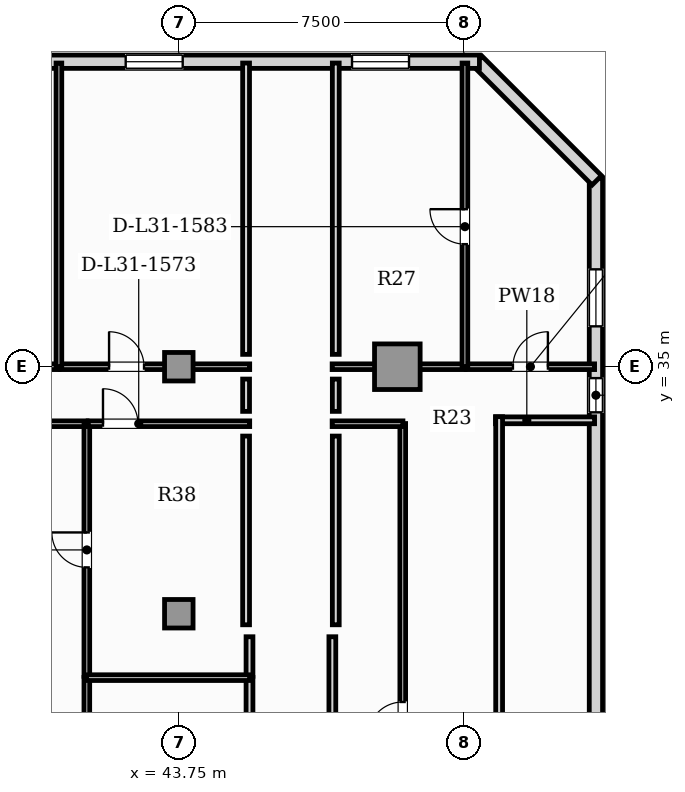
"""IFC4 building model, lengths in metres.
Left out: names, types, materials, properties, quantities, classifications, styles, units other than length and angle.
Written with IfcOpenShell. Run it as: python <this file> out.ifc"""

import sys

from ifc_helpers import new_model, si_unit, direction, frame, frame_2d, origin, origin_2d, place, context, subcontext, project, spatial, rectangle, hollow_rectangle, extrude, element, fill, save


model = new_model("IFC4")
c1 = context("Model", 3, precision=1e-05, world=origin(), true_north=direction((0.0, 1.0)))
c2 = subcontext(c1, "Body", "Model", "MODEL_VIEW")
j1 = project(units=[si_unit("LENGTHUNIT", "METRE"), si_unit("PLANEANGLEUNIT", "RADIAN")], contexts=[c1])
p1 = place(None, origin())
s1 = spatial("IfcSite", under=j1, at=p1, CompositionType="ELEMENT")
p2 = place(p1, origin())
s2 = spatial("IfcBuilding", under=s1, at=p2, CompositionType="ELEMENT")
p3 = place(p2, frame((0.0, 0.0, 127.25)))
s3 = spatial("IfcBuildingStorey", under=s2, at=p3, CompositionType="ELEMENT", Elevation=127.25)
p4 = place(p3, frame((49.5, 35.0, 0.0), z_axis=(0.0, 0.0, 1.0), x_axis=(1.0, 0.0, 0.0)))
e1 = element("IfcColumn", 1, at=p4, inside=s3, PredefinedType="USERDEFINED", context=c2, shape_type="SweptSolid", body=[
    extrude(hollow_rectangle(XDim=1.2, YDim=1.2, WallThickness=0.07, at=origin_2d()), origin(), (0.0, 0.0, 1.0), 3.85),
])
for number, where, z_axis, x_axis in (
    (2, (43.75, 28.5, 0.0), (0.0, 0.0, 1.0), (1.0, 0.0, 0.0)),
    (3, (43.75, 35.0, 0.0), (0.0, 0.0, 1.0), (1.0, 0.0, 0.0)),
):
    element("IfcColumn", number, at=place(p3, frame(where, z_axis=z_axis, x_axis=x_axis)), inside=s3, PredefinedType="COLUMN", context=c2, shape_type="SweptSolid", body=[
        extrude(rectangle(XDim=0.75, YDim=0.75, at=origin_2d()), origin(), (0.0, 0.0, 1.0), 3.85),
    ])
p5 = place(p3, frame((54.725, 3.24, 0.0), z_axis=(0.0, 0.0, 1.0), x_axis=(0.0, 1.0, 0.0)))
e4 = element("IfcWall", 4, at=p5, inside=s3, PredefinedType="SOLIDWALL", context=c2, shape_type="SweptSolid", body=[
    extrude(rectangle(XDim=36.72, YDim=0.35, at=frame_2d((18.36, 0.0))), origin(), (0.0, 0.0, 1.0), 3.6),
])
p6 = place(p5, frame((30.56, 0.0, 0.95)))
e5 = element("IfcOpeningElement", 5, at=p6, cuts=e4, PredefinedType="OPENING", context=c2, shape_type="SweptSolid", body=[
    extrude(rectangle(XDim=0.9, YDim=1.5, at=frame_2d((0.45, 0.75))), frame((0.0, 0.185, 0.0), z_axis=(0.0, -1.0, 0.0), x_axis=(1.0, 0.0, 0.0)), (0.0, 0.0, 1.0), 0.37),
])
p7 = place(p5, frame((12.83, 0.0, 0.9)))
e6 = element("IfcOpeningElement", 6, at=p7, cuts=e4, PredefinedType="OPENING", context=c2, shape_type="SweptSolid", body=[
    extrude(rectangle(XDim=1.5, YDim=1.95, at=frame_2d((0.75, 0.975))), frame((0.0, 0.185, 0.0), z_axis=(0.0, -1.0, 0.0), x_axis=(1.0, 0.0, 0.0)), (0.0, 0.0, 1.0), 0.37),
])
p8 = place(p5, frame((32.823, 0.0, 0.9)))
e7 = element("IfcOpeningElement", 7, at=p8, cuts=e4, PredefinedType="OPENING", context=c2, shape_type="SweptSolid", body=[
    extrude(rectangle(XDim=1.5, YDim=1.95, at=frame_2d((0.75, 0.975))), frame((0.0, 0.185, 0.0), z_axis=(0.0, -1.0, 0.0), x_axis=(1.0, 0.0, 0.0)), (0.0, 0.0, 1.0), 0.37),
])
p9 = place(p3, frame((54.748, 39.905, 0.0), z_axis=(0.0, 0.0, 1.0), x_axis=(-0.707106781187, 0.707106781187, 0.0)))
e8 = element("IfcWall", 8, at=p9, inside=s3, PredefinedType="SOLIDWALL", context=c2, shape_type="SweptSolid", body=[
    extrude(rectangle(XDim=4.446, YDim=0.35, at=frame_2d((2.223, 0.0))), origin(), (0.0, 0.0, 1.0), 3.6),
])
p10 = place(p3, frame((51.66, 43.025, 0.0), z_axis=(0.0, 0.0, 1.0), x_axis=(-1.0, 0.0, 0.0)))
e9 = element("IfcWall", 9, at=p10, inside=s3, PredefinedType="SOLIDWALL", context=c2, shape_type="SweptSolid", body=[
    extrude(rectangle(XDim=45.82, YDim=0.35, at=frame_2d((22.91, 0.0))), origin(), (0.0, 0.0, 1.0), 3.6),
])
p11 = place(p10, frame((42.468, 0.0, 0.9)))
e10 = element("IfcOpeningElement", 10, at=p11, cuts=e9, PredefinedType="OPENING", context=c2, shape_type="SweptSolid", body=[
    extrude(rectangle(XDim=1.5, YDim=1.95, at=frame_2d((0.75, 0.975))), frame((0.0, 0.185, 0.0), z_axis=(0.0, -1.0, 0.0), x_axis=(1.0, 0.0, 0.0)), (0.0, 0.0, 1.0), 0.37),
])
p12 = place(p10, frame((1.853, 0.0, 0.9)))
e11 = element("IfcOpeningElement", 11, at=p12, cuts=e9, PredefinedType="OPENING", context=c2, shape_type="SweptSolid", body=[
    extrude(rectangle(XDim=1.5, YDim=1.95, at=frame_2d((0.75, 0.975))), frame((0.0, 0.185, 0.0), z_axis=(0.0, -1.0, 0.0), x_axis=(1.0, 0.0, 0.0)), (0.0, 0.0, 1.0), 0.37),
])
p13 = place(p10, frame((36.457, 0.0, 0.9)))
e12 = element("IfcOpeningElement", 12, at=p13, cuts=e9, PredefinedType="OPENING", context=c2, shape_type="SweptSolid", body=[
    extrude(rectangle(XDim=1.5, YDim=1.95, at=frame_2d((0.75, 0.975))), frame((0.0, 0.185, 0.0), z_axis=(0.0, -1.0, 0.0), x_axis=(1.0, 0.0, 0.0)), (0.0, 0.0, 1.0), 0.37),
])
p14 = place(p10, frame((31.777, 0.0, 0.9)))
e13 = element("IfcOpeningElement", 13, at=p14, cuts=e9, PredefinedType="OPENING", context=c2, shape_type="SweptSolid", body=[
    extrude(rectangle(XDim=1.5, YDim=1.95, at=frame_2d((0.75, 0.975))), frame((0.0, 0.185, 0.0), z_axis=(0.0, -1.0, 0.0), x_axis=(1.0, 0.0, 0.0)), (0.0, 0.0, 1.0), 0.37),
])
p15 = place(p10, frame((27.748, 0.0, 0.9)))
e14 = element("IfcOpeningElement", 14, at=p15, cuts=e9, PredefinedType="OPENING", context=c2, shape_type="SweptSolid", body=[
    extrude(rectangle(XDim=1.5, YDim=1.95, at=frame_2d((0.75, 0.975))), frame((0.0, 0.185, 0.0), z_axis=(0.0, -1.0, 0.0), x_axis=(1.0, 0.0, 0.0)), (0.0, 0.0, 1.0), 0.37),
])
p16 = place(p10, frame((23.998, 0.0, 0.9)))
e15 = element("IfcOpeningElement", 15, at=p16, cuts=e9, PredefinedType="OPENING", context=c2, shape_type="SweptSolid", body=[
    extrude(rectangle(XDim=1.5, YDim=1.95, at=frame_2d((0.75, 0.975))), frame((0.0, 0.185, 0.0), z_axis=(0.0, -1.0, 0.0), x_axis=(1.0, 0.0, 0.0)), (0.0, 0.0, 1.0), 0.37),
])
p17 = place(p10, frame((20.118, 0.0, 0.9)))
e16 = element("IfcOpeningElement", 16, at=p17, cuts=e9, PredefinedType="OPENING", context=c2, shape_type="SweptSolid", body=[
    extrude(rectangle(XDim=1.5, YDim=1.95, at=frame_2d((0.75, 0.975))), frame((0.0, 0.185, 0.0), z_axis=(0.0, -1.0, 0.0), x_axis=(1.0, 0.0, 0.0)), (0.0, 0.0, 1.0), 0.37),
])
p18 = place(p10, frame((16.368, 0.0, 0.9)))
e17 = element("IfcOpeningElement", 17, at=p18, cuts=e9, PredefinedType="OPENING", context=c2, shape_type="SweptSolid", body=[
    extrude(rectangle(XDim=1.5, YDim=1.95, at=frame_2d((0.75, 0.975))), frame((0.0, 0.185, 0.0), z_axis=(0.0, -1.0, 0.0), x_axis=(1.0, 0.0, 0.0)), (0.0, 0.0, 1.0), 0.37),
])
p19 = place(p10, frame((12.487, 0.0, 0.9)))
e18 = element("IfcOpeningElement", 18, at=p19, cuts=e9, PredefinedType="OPENING", context=c2, shape_type="SweptSolid", body=[
    extrude(rectangle(XDim=1.5, YDim=1.95, at=frame_2d((0.75, 0.975))), frame((0.0, 0.185, 0.0), z_axis=(0.0, -1.0, 0.0), x_axis=(1.0, 0.0, 0.0)), (0.0, 0.0, 1.0), 0.37),
])
p20 = place(p10, frame((7.807, 0.0, 0.9)))
e19 = element("IfcOpeningElement", 19, at=p20, cuts=e9, PredefinedType="OPENING", context=c2, shape_type="SweptSolid", body=[
    extrude(rectangle(XDim=1.5, YDim=1.95, at=frame_2d((0.75, 0.975))), frame((0.0, 0.185, 0.0), z_axis=(0.0, -1.0, 0.0), x_axis=(1.0, 0.0, 0.0)), (0.0, 0.0, 1.0), 0.37),
])
p21 = place(p3, frame((47.79, 17.931, 0.0), z_axis=(0.0, 0.0, 1.0), x_axis=(0.0, 1.0, 0.0)))
e20 = element("IfcWall", 20, at=p21, inside=s3, PredefinedType="PARTITIONING", context=c2, shape_type="SweptSolid", body=[
    extrude(rectangle(XDim=9.964, YDim=0.18, at=frame_2d((4.982, 0.0))), origin(), (0.0, 0.0, 1.0), 3.6),
])
p22 = place(p3, frame((45.61, 21.59, 0.0), z_axis=(0.0, 0.0, 1.0), x_axis=(0.0, 1.0, 0.0)))
e21 = element("IfcWall", 21, at=p22, inside=s3, PredefinedType="PARTITIONING", context=c2, shape_type="SweptSolid", body=[
    extrude(rectangle(XDim=5.234, YDim=0.18, at=frame_2d((2.617, 0.0))), origin(), (0.0, 0.0, 1.0), 3.6),
])
p23 = place(p3, frame((45.61, 26.854, 0.0), z_axis=(0.0, 0.0, 1.0), x_axis=(0.0, 1.0, 0.0)))
e22 = element("IfcWall", 22, at=p23, inside=s3, PredefinedType="PARTITIONING", context=c2, shape_type="SweptSolid", body=[
    extrude(rectangle(XDim=1.041, YDim=0.18, at=frame_2d((0.521, 0.0))), origin(), (0.0, 0.0, 1.0), 3.6),
])
p24 = place(p3, frame((49.642, 17.931, 0.0), z_axis=(0.0, 0.0, 1.0), x_axis=(0.0, 1.0, 0.0)))
e23 = element("IfcWall", 23, at=p24, inside=s3, PredefinedType="PARTITIONING", context=c2, shape_type="SweptSolid", body=[
    extrude(rectangle(XDim=15.573, YDim=0.15, at=frame_2d((7.787, 0.0))), origin(), (0.0, 0.0, 1.0), 3.055),
])
p25 = place(p24, frame((7.327, 0.0, 0.0)))
e24 = element("IfcOpeningElement", 24, at=p25, cuts=e23, PredefinedType="OPENING", context=c2, shape_type="SweptSolid", body=[
    extrude(rectangle(XDim=0.92, YDim=2.1, at=frame_2d((0.46, 1.05))), frame((0.0, 0.085, 0.0), z_axis=(0.0, -1.0, 0.0), x_axis=(1.0, 0.0, 0.0)), (0.0, 0.0, 1.0), 0.17),
])
p26 = place(p3, frame((47.785, 33.5, 0.0), z_axis=(0.0, 0.0, 1.0), x_axis=(1.0, 0.0, 0.0)))
e25 = element("IfcWall", 25, at=p26, inside=s3, PredefinedType="PARTITIONING", context=c2, shape_type="SweptSolid", body=[
    extrude(rectangle(XDim=1.863, YDim=0.15, at=frame_2d((0.931, 0.0))), origin(), (0.0, 0.0, 1.0), 3.6),
])
p27 = place(p3, frame((47.785, 35.0, 0.0), z_axis=(0.0, 0.0, 1.0), x_axis=(1.0, 0.0, 0.0)))
e26 = element("IfcWall", 26, at=p27, inside=s3, PredefinedType="PARTITIONING", context=c2, shape_type="SweptSolid", body=[
    extrude(rectangle(XDim=3.498, YDim=0.15, at=frame_2d((1.749, 0.0))), origin(), (0.0, 0.0, 1.0), 2.983),
])
p28 = place(p3, frame((51.313, 35.0, 0.0), z_axis=(0.0, 0.0, 1.0), x_axis=(1.0, 0.0, 0.0)))
e27 = element("IfcWall", 27, at=p28, inside=s3, PredefinedType="PARTITIONING", context=c2, shape_type="SweptSolid", body=[
    extrude(rectangle(XDim=3.377, YDim=0.15, at=frame_2d((1.688, 0.0))), origin(), (0.0, 0.0, 1.0), 3.6),
])
p29 = place(p28, frame((1.229, 0.0, 0.0)))
e28 = element("IfcOpeningElement", 28, at=p29, cuts=e27, PredefinedType="OPENING", context=c2, shape_type="SweptSolid", body=[
    extrude(rectangle(XDim=0.92, YDim=2.1, at=frame_2d((0.46, 1.05))), frame((0.0, 0.085, 0.0), z_axis=(0.0, -1.0, 0.0), x_axis=(1.0, 0.0, 0.0)), (0.0, 0.0, 1.0), 0.17),
])
p30 = place(p3, frame((51.278, 34.995, 0.0), z_axis=(0.0, 0.0, 1.0), x_axis=(0.0, 1.0, 0.0)))
e29 = element("IfcWall", 29, at=p30, inside=s3, PredefinedType="PARTITIONING", context=c2, shape_type="SweptSolid", body=[
    extrude(rectangle(XDim=7.995, YDim=0.15, at=frame_2d((3.998, 0.0))), origin(), (0.0, 0.0, 1.0), 3.6),
])
p31 = place(p30, frame((3.23, 0.0, 0.0)))
e30 = element("IfcOpeningElement", 30, at=p31, cuts=e29, PredefinedType="OPENING", context=c2, shape_type="SweptSolid", body=[
    extrude(rectangle(XDim=0.92, YDim=2.1, at=frame_2d((0.46, 1.05))), frame((0.0, 0.085, 0.0), z_axis=(0.0, -1.0, 0.0), x_axis=(1.0, 0.0, 0.0)), (0.0, 0.0, 1.0), 0.17),
])
p32 = place(p3, frame((31.435, 33.5, 0.0), z_axis=(0.0, 0.0, 1.0), x_axis=(1.0, 0.0, 0.0)))
e31 = element("IfcWall", 31, at=p32, inside=s3, PredefinedType="PARTITIONING", context=c2, shape_type="SweptSolid", body=[
    extrude(rectangle(XDim=9.9, YDim=0.15, at=frame_2d((4.95, 0.0))), origin(), (0.0, 0.0, 1.0), 3.6),
])
p33 = place(p32, frame((3.005, 0.0, 0.0)))
e32 = element("IfcOpeningElement", 32, at=p33, cuts=e31, PredefinedType="OPENING", context=c2, shape_type="SweptSolid", body=[
    extrude(rectangle(XDim=0.92, YDim=2.1, at=frame_2d((0.46, 1.05))), frame((0.0, 0.085, 0.0), z_axis=(0.0, -1.0, 0.0), x_axis=(1.0, 0.0, 0.0)), (0.0, 0.0, 1.0), 0.17),
])
p34 = place(p3, frame((41.33, 21.59, 0.0), z_axis=(0.0, 0.0, 1.0), x_axis=(0.0, 1.0, 0.0)))
e33 = element("IfcWall", 33, at=p34, inside=s3, PredefinedType="PARTITIONING", context=c2, shape_type="SweptSolid", body=[
    extrude(rectangle(XDim=5.234, YDim=0.15, at=frame_2d((2.617, 0.0))), origin(), (0.0, 0.0, 1.0), 3.6),
])
p35 = place(p34, frame((2.157, 0.0, 0.0)))
e34 = element("IfcOpeningElement", 34, at=p35, cuts=e33, PredefinedType="OPENING", context=c2, shape_type="SweptSolid", body=[
    extrude(rectangle(XDim=0.92, YDim=2.1, at=frame_2d((0.46, 1.05))), frame((0.0, 0.085, 0.0), z_axis=(0.0, -1.0, 0.0), x_axis=(1.0, 0.0, 0.0)), (0.0, 0.0, 1.0), 0.17),
])
p36 = place(p3, frame((41.33, 26.854, 0.0), z_axis=(0.0, 0.0, 1.0), x_axis=(0.0, 1.0, 0.0)))
e35 = element("IfcWall", 35, at=p36, inside=s3, PredefinedType="PARTITIONING", context=c2, shape_type="SweptSolid", body=[
    extrude(rectangle(XDim=6.651, YDim=0.15, at=frame_2d((3.325, 0.0))), origin(), (0.0, 0.0, 1.0), 3.6),
])
p37 = place(p36, frame((2.865, 0.0, 0.0)))
e36 = element("IfcOpeningElement", 36, at=p37, cuts=e35, PredefinedType="OPENING", context=c2, shape_type="SweptSolid", body=[
    extrude(rectangle(XDim=0.92, YDim=2.1, at=frame_2d((0.46, 1.05))), frame((0.0, 0.085, 0.0), z_axis=(0.0, -1.0, 0.0), x_axis=(1.0, 0.0, 0.0)), (0.0, 0.0, 1.0), 0.17),
])
p38 = place(p3, frame((41.365, 33.5, 0.0), z_axis=(0.0, 0.0, 1.0), x_axis=(1.0, 0.0, 0.0)))
e37 = element("IfcWall", 37, at=p38, inside=s3, PredefinedType="PARTITIONING", context=c2, shape_type="SweptSolid", body=[
    extrude(rectangle(XDim=4.25, YDim=0.15, at=frame_2d((2.125, 0.0))), origin(), (0.0, 0.0, 1.0), 3.6),
])
p39 = place(p38, frame((0.39, 0.0, 0.0)))
e38 = element("IfcOpeningElement", 38, at=p39, cuts=e37, PredefinedType="OPENING", context=c2, shape_type="SweptSolid", body=[
    extrude(rectangle(XDim=0.92, YDim=2.1, at=frame_2d((0.46, 1.05))), frame((0.0, 0.085, 0.0), z_axis=(0.0, -1.0, 0.0), x_axis=(1.0, 0.0, 0.0)), (0.0, 0.0, 1.0), 0.17),
])
p40 = place(p3, frame((36.285, 35.0, 0.0), z_axis=(0.0, 0.0, 1.0), x_axis=(1.0, 0.0, 0.0)))
e39 = element("IfcWall", 39, at=p40, inside=s3, PredefinedType="PARTITIONING", context=c2, shape_type="SweptSolid", body=[
    extrude(rectangle(XDim=4.315, YDim=0.15, at=frame_2d((2.158, 0.0))), origin(), (0.0, 0.0, 1.0), 2.983),
])
p41 = place(p40, frame((1.698, 0.0, 0.0)))
e40 = element("IfcOpeningElement", 40, at=p41, cuts=e39, PredefinedType="OPENING", context=c2, shape_type="SweptSolid", body=[
    extrude(rectangle(XDim=0.92, YDim=2.1, at=frame_2d((0.46, 1.05))), frame((0.0, 0.085, 0.0), z_axis=(0.0, -1.0, 0.0), x_axis=(1.0, 0.0, 0.0)), (0.0, 0.0, 1.0), 0.17),
])
p42 = place(p3, frame((40.63, 35.0, 0.0), z_axis=(0.0, 0.0, 1.0), x_axis=(1.0, 0.0, 0.0)))
e41 = element("IfcWall", 41, at=p42, inside=s3, PredefinedType="PARTITIONING", context=c2, shape_type="SweptSolid", body=[
    extrude(rectangle(XDim=4.985, YDim=0.15, at=frame_2d((2.492, 0.0))), origin(), (0.0, 0.0, 1.0), 2.983),
])
p43 = place(p42, frame((1.285, 0.0, 0.0)))
e42 = element("IfcOpeningElement", 42, at=p43, cuts=e41, PredefinedType="OPENING", context=c2, shape_type="SweptSolid", body=[
    extrude(rectangle(XDim=0.92, YDim=2.1, at=frame_2d((0.46, 1.05))), frame((0.0, 0.085, 0.0), z_axis=(0.0, -1.0, 0.0), x_axis=(1.0, 0.0, 0.0)), (0.0, 0.0, 1.0), 0.17),
])
p44 = place(p3, frame((41.325, 26.819, 0.0), z_axis=(0.0, 0.0, 1.0), x_axis=(1.0, 0.0, 0.0)))
e43 = element("IfcWall", 43, at=p44, inside=s3, PredefinedType="PARTITIONING", context=c2, shape_type="SweptSolid", body=[
    extrude(rectangle(XDim=4.29, YDim=0.15, at=frame_2d((2.145, 0.0))), origin(), (0.0, 0.0, 1.0), 3.6),
])
p45 = place(p3, frame((40.595, 34.995, 0.0), z_axis=(0.0, 0.0, 1.0), x_axis=(0.0, 1.0, 0.0)))
e44 = element("IfcWall", 44, at=p45, inside=s3, PredefinedType="PARTITIONING", context=c2, shape_type="SweptSolid", body=[
    extrude(rectangle(XDim=7.995, YDim=0.15, at=frame_2d((3.998, 0.0))), origin(), (0.0, 0.0, 1.0), 3.6),
])
p46 = place(p3, frame((47.88, 33.825, 0.0), z_axis=(0.0, 0.0, 1.0), x_axis=(0.0, 1.0, 0.0)))
e45 = element("IfcWall", 45, at=p46, inside=s3, PredefinedType="PARTITIONING", context=c2, shape_type="SweptSolid", body=[
    extrude(rectangle(XDim=0.85, YDim=0.18, at=frame_2d((0.425, 0.0))), origin(), (0.0, 0.0, 1.0), 3.6),
])
p47 = place(p3, frame((54.69, 33.59, 0.0), z_axis=(0.0, 0.0, 1.0), x_axis=(-1.0, 0.0, 0.0)))
e46 = element("IfcWall", 46, at=p47, inside=s3, PredefinedType="PARTITIONING", context=c2, shape_type="SweptSolid", body=[
    extrude(rectangle(XDim=2.606, YDim=0.18, at=frame_2d((1.303, 0.0))), origin(), (0.0, 0.0, 1.0), 3.6),
])
p48 = place(p3, frame((52.178, 33.685, 0.0), z_axis=(0.0, 0.0, 1.0), x_axis=(0.0, -1.0, 0.0)))
e47 = element("IfcWall", 47, at=p48, inside=s3, PredefinedType="PARTITIONING", context=c2, shape_type="SweptSolid", body=[
    extrude(rectangle(XDim=13.495, YDim=0.18, at=frame_2d((6.748, 0.0))), origin(), (0.0, 0.0, 1.0), 3.6),
])
p49 = place(p3, frame((47.88, 28.21, 0.0), z_axis=(0.0, 0.0, 1.0), x_axis=(0.0, 1.0, 0.0)))
e48 = element("IfcWall", 48, at=p49, inside=s3, PredefinedType="PARTITIONING", context=c2, shape_type="SweptSolid", body=[
    extrude(rectangle(XDim=4.965, YDim=0.18, at=frame_2d((2.482, 0.0))), origin(), (0.0, 0.0, 1.0), 3.6),
])
p50 = place(p3, frame((47.88, 35.325, 0.0), z_axis=(0.0, 0.0, 1.0), x_axis=(0.0, 1.0, 0.0)))
e49 = element("IfcWall", 49, at=p50, inside=s3, PredefinedType="PARTITIONING", context=c2, shape_type="SweptSolid", body=[
    extrude(rectangle(XDim=7.665, YDim=0.18, at=frame_2d((3.833, 0.0))), origin(), (0.0, 0.0, 1.0), 3.6),
])
p51 = place(p3, frame((45.52, 34.675, 0.0), z_axis=(0.0, 0.0, 1.0), x_axis=(0.0, -1.0, 0.0)))
e50 = element("IfcWall", 50, at=p51, inside=s3, PredefinedType="PARTITIONING", context=c2, shape_type="SweptSolid", body=[
    extrude(rectangle(XDim=0.85, YDim=0.18, at=frame_2d((0.425, 0.0))), origin(), (0.0, 0.0, 1.0), 3.6),
])
p52 = place(p3, frame((45.52, 33.175, 0.0), z_axis=(0.0, 0.0, 1.0), x_axis=(0.0, -1.0, 0.0)))
e51 = element("IfcWall", 51, at=p52, inside=s3, PredefinedType="PARTITIONING", context=c2, shape_type="SweptSolid", body=[
    extrude(rectangle(XDim=4.965, YDim=0.18, at=frame_2d((2.482, 0.0))), origin(), (0.0, 0.0, 1.0), 3.6),
])
p53 = place(p3, frame((45.52, 42.99, 0.0), z_axis=(0.0, 0.0, 1.0), x_axis=(0.0, -1.0, 0.0)))
e52 = element("IfcWall", 52, at=p53, inside=s3, PredefinedType="PARTITIONING", context=c2, shape_type="SweptSolid", body=[
    extrude(rectangle(XDim=7.665, YDim=0.18, at=frame_2d((3.833, 0.0))), origin(), (0.0, 0.0, 1.0), 3.6),
])
p54 = place(p6, origin())
e53 = element("IfcWindow", 53, at=p54, inside=s3, PartitioningType="SINGLE_PANEL", PredefinedType="WINDOW", context=c2, shape_type="SweptSolid", body=[
    extrude(rectangle(XDim=0.9, YDim=1.5, at=frame_2d((0.45, 0.75))), frame((0.0, 0.03, 0.0), z_axis=(0.0, -1.0, 0.0), x_axis=(1.0, 0.0, 0.0)), (0.0, 0.0, 1.0), 0.06),
])
fill(e5, e53)
p55 = place(p12, origin())
e54 = element("IfcWindow", 54, at=p55, inside=s3, PartitioningType="SINGLE_PANEL", PredefinedType="WINDOW", context=c2, shape_type="SweptSolid", body=[
    extrude(rectangle(XDim=1.5, YDim=1.95, at=frame_2d((0.75, 0.975))), frame((0.0, 0.03, 0.0), z_axis=(0.0, -1.0, 0.0), x_axis=(1.0, 0.0, 0.0)), (0.0, 0.0, 1.0), 0.06),
])
fill(e11, e54)
p56 = place(p8, origin())
e55 = element("IfcWindow", 55, at=p56, inside=s3, PartitioningType="SINGLE_PANEL", PredefinedType="WINDOW", context=c2, shape_type="SweptSolid", body=[
    extrude(rectangle(XDim=1.5, YDim=1.95, at=frame_2d((0.75, 0.975))), frame((0.0, 0.03, 0.0), z_axis=(0.0, -1.0, 0.0), x_axis=(1.0, 0.0, 0.0)), (0.0, 0.0, 1.0), 0.06),
])
fill(e7, e55)
p57 = place(p20, origin())
e56 = element("IfcWindow", 56, at=p57, inside=s3, PartitioningType="SINGLE_PANEL", PredefinedType="WINDOW", context=c2, shape_type="SweptSolid", body=[
    extrude(rectangle(XDim=1.5, YDim=1.95, at=frame_2d((0.75, 0.975))), frame((0.0, 0.03, 0.0), z_axis=(0.0, -1.0, 0.0), x_axis=(1.0, 0.0, 0.0)), (0.0, 0.0, 1.0), 0.06),
])
fill(e19, e56)
p58 = place(p25, origin())
e57 = element("IfcDoor", 57, at=p58, inside=s3, OperationType="SINGLE_SWING_LEFT", PredefinedType="DOOR", context=c2, shape_type="SweptSolid", body=[
    extrude(rectangle(XDim=0.92, YDim=2.1, at=frame_2d((0.46, 1.05))), frame((0.0, 0.025, 0.0), z_axis=(0.0, -1.0, 0.0), x_axis=(1.0, 0.0, 0.0)), (0.0, 0.0, 1.0), 0.05),
])
fill(e24, e57)
p59 = place(p29, origin())
e58 = element("IfcDoor", 58, at=p59, inside=s3, OperationType="SINGLE_SWING_RIGHT", PredefinedType="DOOR", context=c2, shape_type="SweptSolid", body=[
    extrude(rectangle(XDim=0.92, YDim=2.1, at=frame_2d((0.46, 1.05))), frame((0.0, 0.025, 0.0), z_axis=(0.0, -1.0, 0.0), x_axis=(1.0, 0.0, 0.0)), (0.0, 0.0, 1.0), 0.05),
])
fill(e28, e58)
p60 = place(p37, origin())
e59 = element("IfcDoor", 59, at=p60, inside=s3, OperationType="SINGLE_SWING_RIGHT", PredefinedType="DOOR", context=c2, shape_type="SweptSolid", body=[
    extrude(rectangle(XDim=0.92, YDim=2.1, at=frame_2d((0.46, 1.05))), frame((0.0, 0.025, 0.0), z_axis=(0.0, -1.0, 0.0), x_axis=(1.0, 0.0, 0.0)), (0.0, 0.0, 1.0), 0.05),
])
fill(e36, e59)
p61 = place(p39, origin())
e60 = element("IfcDoor", 60, at=p61, inside=s3, OperationType="SINGLE_SWING_LEFT", PredefinedType="DOOR", context=c2, shape_type="SweptSolid", body=[
    extrude(rectangle(XDim=0.92, YDim=2.1, at=frame_2d((0.46, 1.05))), frame((0.0, 0.025, 0.0), z_axis=(0.0, -1.0, 0.0), x_axis=(1.0, 0.0, 0.0)), (0.0, 0.0, 1.0), 0.05),
])
fill(e38, e60)
p62 = place(p43, origin())
e61 = element("IfcDoor", 61, at=p62, inside=s3, OperationType="SINGLE_SWING_LEFT", PredefinedType="DOOR", context=c2, shape_type="SweptSolid", body=[
    extrude(rectangle(XDim=0.92, YDim=2.1, at=frame_2d((0.46, 1.05))), frame((0.0, 0.025, 0.0), z_axis=(0.0, -1.0, 0.0), x_axis=(1.0, 0.0, 0.0)), (0.0, 0.0, 1.0), 0.05),
])
fill(e42, e61)
p63 = place(p31, origin())
e62 = element("IfcDoor", 62, at=p63, inside=s3, OperationType="SINGLE_SWING_RIGHT", PredefinedType="DOOR", context=c2, shape_type="SweptSolid", body=[
    extrude(rectangle(XDim=0.92, YDim=2.1, at=frame_2d((0.46, 1.05))), frame((0.0, 0.025, 0.0), z_axis=(0.0, -1.0, 0.0), x_axis=(1.0, 0.0, 0.0)), (0.0, 0.0, 1.0), 0.05),
])
fill(e30, e62)
save(model, sys.argv[1])
